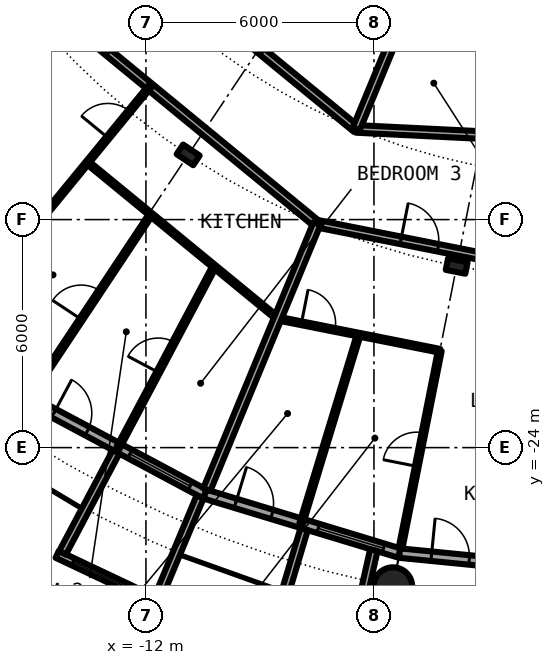
"""IFC4 building model, lengths in metres.
Left out: names, types, materials, properties, quantities, classifications, styles, units other than length and angle.
Written with IfcOpenShell. Run it as: python <this file> out.ifc"""

import sys

from ifc_helpers import new_model, si_unit, direction, frame, frame_2d, origin, origin_2d, place, context, subcontext, project, spatial, rectangle, circle, hollow_circle, i_section, extrude, element, fill, save


model = new_model("IFC4")
c1 = context("Model", 3, precision=1e-05, world=origin(), true_north=direction((0.0, 1.0)))
c2 = subcontext(c1, "Body", "Model", "MODEL_VIEW")
j1 = project(units=[si_unit("LENGTHUNIT", "METRE"), si_unit("PLANEANGLEUNIT", "RADIAN")], contexts=[c1])
p1 = place(None, origin())
s1 = spatial("IfcSite", under=j1, at=p1, CompositionType="ELEMENT")
p2 = place(p1, origin())
s2 = spatial("IfcBuilding", under=s1, at=p2, CompositionType="ELEMENT")
p3 = place(p2, frame((0.0, 0.0, 69.7)))
s3 = spatial("IfcBuildingStorey", under=s2, at=p3, CompositionType="ELEMENT", Elevation=69.7)
p4 = place(p3, frame((-5.501, -27.658, 0.0), z_axis=(0.0, 0.0, 1.0), x_axis=(1.0, 0.0, 0.0)))
e1 = element("IfcColumn", 1, at=p4, inside=s3, PredefinedType="COLUMN", context=c2, shape_type="SweptSolid", body=[
    extrude(hollow_circle(Radius=0.508, WallThickness=0.04, at=origin_2d()), origin(), (0.0, 0.0, 1.0), 3.05),
])
for number, where, z_axis, x_axis in (
    (2, (-10.889, -16.297, 0.0), (0.0, 0.0, 1.0), (-0.556, -0.831, 0.0)),
    (3, (-3.824, -19.223, 0.0), (0.0, 0.0, 1.0), (-0.195, -0.981, 0.0)),
):
    element("IfcColumn", number, at=place(p3, frame(where, z_axis=z_axis, x_axis=x_axis)), inside=s3, PredefinedType="COLUMN", context=c2, shape_type="SweptSolid", body=[
        extrude(i_section(OverallWidth=0.306, OverallDepth=0.524, WebThickness=0.021, FlangeThickness=0.04, FilletRadius=0.027, at=origin_2d()), origin(), (0.0, 0.0, 1.0), 3.05),
    ])
p5 = place(p3, frame((-15.167, -22.699, 0.0), z_axis=(0.0, 0.0, 1.0), x_axis=(0.881915646801, -0.471407246368, 0.0)))
e4 = element("IfcWall", 4, at=p5, inside=s3, PredefinedType="SOLIDWALL", context=c2, shape_type="SweptSolid", body=[
    extrude(rectangle(XDim=5.352, YDim=0.25, at=frame_2d((2.676, 0.0))), origin(), (0.0, 0.0, 1.0), 2.7),
])
p6 = place(p5, frame((0.841, 0.0, 0.0)))
e5 = element("IfcOpeningElement", 5, at=p6, cuts=e4, PredefinedType="OPENING", context=c2, shape_type="SweptSolid", body=[
    extrude(rectangle(XDim=1.0, YDim=2.2, at=frame_2d((0.5, 1.1))), frame((0.0, 0.135, 0.0), z_axis=(0.0, -1.0, 0.0), x_axis=(1.0, 0.0, 0.0)), (0.0, 0.0, 1.0), 0.27),
])
p7 = place(p5, frame((3.111, 0.0, 0.3)))
e6 = element("IfcOpeningElement", 6, at=p7, cuts=e4, PredefinedType="OPENING", context=c2, shape_type="SweptSolid", body=[
    extrude(rectangle(XDim=1.8, YDim=2.1, at=frame_2d((0.9, 1.05))), frame((0.0, 0.135, 0.0), z_axis=(0.0, -1.0, 0.0), x_axis=(1.0, 0.0, 0.0)), (0.0, 0.0, 1.0), 0.27),
])
p8 = place(p3, frame((-14.335, -26.808, -0.03), z_axis=(0.0, 0.0, 1.0), x_axis=(0.904000060331, -0.427532327342, 0.0)))
e7 = element("IfcWall", 7, at=p8, inside=s3, PredefinedType="SOLIDWALL", context=c2, shape_type="SweptSolid", body=[
    extrude(rectangle(XDim=2.993, YDim=0.2, at=frame_2d((1.497, 0.0))), origin(), (0.0, 0.0, 1.0), 2.73),
])
p9 = place(p8, frame((0.457, 0.0, 0.33)))
e8 = element("IfcOpeningElement", 8, at=p9, cuts=e7, PredefinedType="OPENING", context=c2, shape_type="SweptSolid", body=[
    extrude(circle(Radius=1.04, at=frame_2d((1.04, 1.04))), frame((0.0, 0.11, 0.0), z_axis=(0.0, -1.0, 0.0), x_axis=(1.0, 0.0, 0.0)), (0.0, 0.0, 1.0), 0.22),
])
p10 = place(p3, frame((-12.787, -24.113, -0.03), z_axis=(0.0, 0.0, 1.0), x_axis=(-0.468365282436, -0.883534924159, 0.0)))
e9 = element("IfcWall", 9, at=p10, inside=s3, PredefinedType="SOLIDWALL", context=c2, shape_type="SweptSolid", body=[
    extrude(rectangle(XDim=3.006, YDim=0.2, at=frame_2d((1.503, 0.0))), origin(), (0.0, 0.0, 1.0), 2.73),
])
p11 = place(p3, frame((-10.575, -25.295, -0.03), z_axis=(0.0, 0.0, 1.0), x_axis=(-0.385697364644, -0.922625353492, 0.0)))
e10 = element("IfcWall", 10, at=p11, inside=s3, PredefinedType="SOLIDWALL", context=c2, shape_type="SweptSolid", body=[
    extrude(rectangle(XDim=2.883, YDim=0.2, at=frame_2d((1.442, 0.0))), origin(), (0.0, 0.0, 1.0), 2.73),
])
p12 = place(p3, frame((-10.447, -25.222, 0.0), z_axis=(0.0, 0.0, 1.0), x_axis=(0.956965678721, -0.290201119486, 0.0)))
e11 = element("IfcWall", 11, at=p12, inside=s3, PredefinedType="SOLIDWALL", context=c2, shape_type="SweptSolid", body=[
    extrude(rectangle(XDim=5.351, YDim=0.25, at=frame_2d((2.676, 0.0))), origin(), (0.0, 0.0, 1.0), 2.7),
])
p13 = place(p12, frame((0.841, 0.0, 0.0)))
e12 = element("IfcOpeningElement", 12, at=p13, cuts=e11, PredefinedType="OPENING", context=c2, shape_type="SweptSolid", body=[
    extrude(rectangle(XDim=1.0, YDim=2.2, at=frame_2d((0.5, 1.1))), frame((0.0, 0.135, 0.0), z_axis=(0.0, -1.0, 0.0), x_axis=(1.0, 0.0, 0.0)), (0.0, 0.0, 1.0), 0.27),
])
p14 = place(p12, frame((3.111, 0.0, 0.3)))
e13 = element("IfcOpeningElement", 13, at=p14, cuts=e11, PredefinedType="OPENING", context=c2, shape_type="SweptSolid", body=[
    extrude(rectangle(XDim=1.8, YDim=2.1, at=frame_2d((0.9, 1.05))), frame((0.0, 0.135, 0.0), z_axis=(0.0, -1.0, 0.0), x_axis=(1.0, 0.0, 0.0)), (0.0, 0.0, 1.0), 0.27),
])
p15 = place(p3, frame((-7.837, -26.144, -0.03), z_axis=(0.0, 0.0, 1.0), x_axis=(-0.287064767992, -0.957911174889, 0.0)))
e14 = element("IfcWall", 14, at=p15, inside=s3, PredefinedType="SOLIDWALL", context=c2, shape_type="SweptSolid", body=[
    extrude(rectangle(XDim=3.006, YDim=0.2, at=frame_2d((1.503, 0.0))), origin(), (0.0, 0.0, 1.0), 2.73),
])
p16 = place(p3, frame((-6.004, -26.7, -0.03), z_axis=(0.0, 0.0, 1.0), x_axis=(-0.219609259383, -0.975587911566, 0.0)))
e15 = element("IfcWall", 15, at=p16, inside=s3, PredefinedType="SOLIDWALL", context=c2, shape_type="SweptSolid", body=[
    extrude(rectangle(XDim=2.933, YDim=0.2, at=frame_2d((1.466, 0.0))), origin(), (0.0, 0.0, 1.0), 2.73),
])
p17 = place(p3, frame((-5.326, -26.775, 0.0), z_axis=(0.0, 0.0, 1.0), x_axis=(0.995173996315, -0.098126026407, 0.0)))
e16 = element("IfcWall", 16, at=p17, inside=s3, PredefinedType="SOLIDWALL", context=c2, shape_type="SweptSolid", body=[
    extrude(rectangle(XDim=5.352, YDim=0.25, at=frame_2d((2.676, 0.0))), origin(), (0.0, 0.0, 1.0), 2.7),
])
p18 = place(p17, frame((0.841, 0.0, 0.0)))
e17 = element("IfcOpeningElement", 17, at=p18, cuts=e16, PredefinedType="OPENING", context=c2, shape_type="SweptSolid", body=[
    extrude(rectangle(XDim=1.0, YDim=2.2, at=frame_2d((0.5, 1.1))), frame((0.0, 0.135, 0.0), z_axis=(0.0, -1.0, 0.0), x_axis=(1.0, 0.0, 0.0)), (0.0, 0.0, 1.0), 0.27),
])
p19 = place(p17, frame((3.111, 0.0, 0.3)))
e18 = element("IfcOpeningElement", 18, at=p19, cuts=e16, PredefinedType="OPENING", context=c2, shape_type="SweptSolid", body=[
    extrude(rectangle(XDim=1.8, YDim=2.1, at=frame_2d((0.9, 1.05))), frame((0.0, 0.135, 0.0), z_axis=(0.0, -1.0, 0.0), x_axis=(1.0, 0.0, 0.0)), (0.0, 0.0, 1.0), 0.27),
])
p20 = place(p3, frame((-8.536, -20.603, 0.0), z_axis=(0.0, 0.0, 1.0), x_axis=(0.980795826794, -0.195037294239, 0.0)))
e19 = element("IfcWall", 19, at=p20, inside=s3, PredefinedType="PARTITIONING", context=c2, shape_type="SweptSolid", body=[
    extrude(rectangle(XDim=4.352, YDim=0.1, at=frame_2d((2.176, 0.0))), origin(), (0.0, 0.0, 1.0), 2.7),
])
p21 = place(p20, frame((0.639, 0.0, 0.0)))
e20 = element("IfcOpeningElement", 20, at=p21, cuts=e19, PredefinedType="OPENING", context=c2, shape_type="SweptSolid", body=[
    extrude(rectangle(XDim=0.9, YDim=2.3, at=frame_2d((0.45, 1.15))), frame((0.0, 0.06, 0.0), z_axis=(0.0, -1.0, 0.0), x_axis=(1.0, 0.0, 0.0)), (0.0, 0.0, 1.0), 0.12),
])
p22 = place(p3, frame((-13.538, -16.496, 0.0), z_axis=(0.0, 0.0, 1.0), x_axis=(0.773000340237, -0.634405606843, 0.0)))
e21 = element("IfcWall", 21, at=p22, inside=s3, PredefinedType="PARTITIONING", context=c2, shape_type="SweptSolid", body=[
    extrude(rectangle(XDim=6.474, YDim=0.1, at=frame_2d((3.237, 0.0))), origin(), (0.0, 0.0, 1.0), 2.7),
])
p23 = place(p3, frame((-7.501, -18.108, 0.0), z_axis=(0.0, 0.0, 1.0), x_axis=(0.980781515054, -0.195109250749, 0.0)))
e22 = element("IfcWall", 22, at=p23, inside=s3, PredefinedType="PARTITIONING", context=c2, shape_type="SweptSolid", body=[
    extrude(rectangle(XDim=7.648, YDim=0.2, at=frame_2d((3.824, 0.0))), origin(), (0.0, 0.0, 1.0), 2.38),
])
p24 = place(p23, frame((2.25, 0.0, 0.0)))
e23 = element("IfcOpeningElement", 23, at=p24, cuts=e22, PredefinedType="OPENING", context=c2, shape_type="SweptSolid", body=[
    extrude(rectangle(XDim=1.0, YDim=2.3, at=frame_2d((0.5, 1.15))), frame((0.0, 0.11, 0.0), z_axis=(0.0, -1.0, 0.0), x_axis=(1.0, 0.0, 0.0)), (0.0, 0.0, 1.0), 0.22),
])
p25 = place(p3, frame((-16.172, -10.99, 0.0), z_axis=(0.0, 0.0, 1.0), x_axis=(0.772669779479, -0.634808169355, 0.0)))
e24 = element("IfcWall", 24, at=p25, inside=s3, PredefinedType="PARTITIONING", context=c2, shape_type="SweptSolid", body=[
    extrude(rectangle(XDim=11.208, YDim=0.2, at=frame_2d((5.604, 0.0))), origin(), (0.0, 0.0, 1.0), 2.38),
])
p26 = place(p25, frame((3.135, 0.0, 0.0)))
e25 = element("IfcOpeningElement", 25, at=p26, cuts=e24, PredefinedType="OPENING", context=c2, shape_type="SweptSolid", body=[
    extrude(rectangle(XDim=1.0, YDim=2.3, at=frame_2d((0.5, 1.15))), frame((0.0, 0.11, 0.0), z_axis=(0.0, -1.0, 0.0), x_axis=(1.0, 0.0, 0.0)), (0.0, 0.0, 1.0), 0.22),
])
p27 = place(p3, frame((-14.05, -9.392, 0.0), z_axis=(0.0, 0.0, 1.0), x_axis=(0.773074935257, -0.634314704605, 0.0)))
e26 = element("IfcWall", 26, at=p27, inside=s3, PredefinedType="PARTITIONING", context=c2, shape_type="SweptSolid", body=[
    extrude(rectangle(XDim=9.809, YDim=0.2, at=frame_2d((4.904, 0.0))), origin(), (0.0, 0.0, 1.0), 2.7),
])
p28 = place(p27, frame((4.402, 0.0, 0.0)))
e27 = element("IfcOpeningElement", 27, at=p28, cuts=e26, PredefinedType="OPENING", context=c2, shape_type="SweptSolid", body=[
    extrude(rectangle(XDim=1.0, YDim=2.3, at=frame_2d((0.5, 1.15))), frame((0.0, 0.11, 0.0), z_axis=(0.0, -1.0, 0.0), x_axis=(1.0, 0.0, 0.0)), (0.0, 0.0, 1.0), 0.22),
])
p29 = place(p3, frame((-6.469, -15.614, 0.0), z_axis=(0.0, 0.0, 1.0), x_axis=(0.998798520108, -0.049005267363, 0.0)))
e28 = element("IfcWall", 28, at=p29, inside=s3, PredefinedType="PARTITIONING", context=c2, shape_type="SweptSolid", body=[
    extrude(rectangle(XDim=11.389, YDim=0.2, at=frame_2d((5.694, 0.0))), origin(), (0.0, 0.0, 1.0), 2.7),
])
p30 = place(p29, frame((4.383, 0.0, 0.0)))
e29 = element("IfcOpeningElement", 29, at=p30, cuts=e28, PredefinedType="OPENING", context=c2, shape_type="SweptSolid", body=[
    extrude(rectangle(XDim=1.0, YDim=2.3, at=frame_2d((0.5, 1.15))), frame((0.0, 0.11, 0.0), z_axis=(0.0, -1.0, 0.0), x_axis=(1.0, 0.0, 0.0)), (0.0, 0.0, 1.0), 0.22),
])
p31 = place(p3, frame((-17.24, -21.007, 0.0), z_axis=(0.0, 0.0, 1.0), x_axis=(0.634396151441, 0.77300810024, 0.0)))
e30 = element("IfcWall", 30, at=p31, inside=s3, PredefinedType="PARTITIONING", context=c2, shape_type="SweptSolid", body=[
    extrude(rectangle(XDim=8.419, YDim=0.1, at=frame_2d((4.209, 0.0))), origin(), (0.0, 0.0, 1.0), 2.7),
])
p32 = place(p31, frame((6.679, 0.0, 0.0)))
e31 = element("IfcOpeningElement", 31, at=p32, cuts=e30, PredefinedType="OPENING", context=c2, shape_type="SweptSolid", body=[
    extrude(rectangle(XDim=0.9, YDim=2.3, at=frame_2d((0.45, 1.15))), frame((0.0, 0.06, 0.0), z_axis=(0.0, -1.0, 0.0), x_axis=(1.0, 0.0, 0.0)), (0.0, 0.0, 1.0), 0.12),
])
p33 = place(p31, frame((2.468, 0.0, 0.0)))
e32 = element("IfcOpeningElement", 32, at=p33, cuts=e30, PredefinedType="OPENING", context=c2, shape_type="SweptSolid", body=[
    extrude(rectangle(XDim=0.9, YDim=2.3, at=frame_2d((0.45, 1.15))), frame((0.0, 0.06, 0.0), z_axis=(0.0, -1.0, 0.0), x_axis=(1.0, 0.0, 0.0)), (0.0, 0.0, 1.0), 0.12),
])
p34 = place(p3, frame((-15.041, -22.632, 0.0), z_axis=(0.0, 0.0, 1.0), x_axis=(0.553637025191, 0.83275809473, 0.0)))
e33 = element("IfcWall", 33, at=p34, inside=s3, PredefinedType="PARTITIONING", context=c2, shape_type="SweptSolid", body=[
    extrude(rectangle(XDim=5.726, YDim=0.1, at=frame_2d((2.863, 0.0))), origin(), (0.0, 0.0, 1.0), 2.7),
])
p35 = place(p34, frame((2.412, 0.0, 0.0)))
e34 = element("IfcOpeningElement", 34, at=p35, cuts=e33, PredefinedType="OPENING", context=c2, shape_type="SweptSolid", body=[
    extrude(rectangle(XDim=0.9, YDim=2.3, at=frame_2d((0.45, 1.15))), frame((0.0, 0.06, 0.0), z_axis=(0.0, -1.0, 0.0), x_axis=(1.0, 0.0, 0.0)), (0.0, 0.0, 1.0), 0.12),
])
p36 = place(p3, frame((-12.734, -24.007, 0.0), z_axis=(0.0, 0.0, 1.0), x_axis=(0.468610030042, 0.883405139075, 0.0)))
e35 = element("IfcWall", 35, at=p36, inside=s3, PredefinedType="PARTITIONING", context=c2, shape_type="SweptSolid", body=[
    extrude(rectangle(XDim=5.403, YDim=0.1, at=frame_2d((2.702, 0.0))), origin(), (0.0, 0.0, 1.0), 2.7),
])
p37 = place(p36, frame((2.252, 0.0, 0.0)))
e36 = element("IfcOpeningElement", 36, at=p37, cuts=e35, PredefinedType="OPENING", context=c2, shape_type="SweptSolid", body=[
    extrude(rectangle(XDim=0.9, YDim=2.3, at=frame_2d((0.45, 1.15))), frame((0.0, 0.06, 0.0), z_axis=(0.0, -1.0, 0.0), x_axis=(1.0, 0.0, 0.0)), (0.0, 0.0, 1.0), 0.12),
])
p38 = place(p3, frame((-10.399, -25.106, 0.0), z_axis=(0.0, 0.0, 1.0), x_axis=(0.382600411313, 0.923913916587, 0.0)))
e37 = element("IfcWall", 37, at=p38, inside=s3, PredefinedType="PARTITIONING", context=c2, shape_type="SweptSolid", body=[
    extrude(rectangle(XDim=7.574, YDim=0.2, at=frame_2d((3.787, 0.0))), origin(), (0.0, 0.0, 1.0), 2.7),
])
p39 = place(p3, frame((-7.913, -25.997, 0.0), z_axis=(0.0, 0.0, 1.0), x_axis=(0.291264462755, 0.956642573136, 0.0)))
e38 = element("IfcWall", 38, at=p39, inside=s3, PredefinedType="PARTITIONING", context=c2, shape_type="SweptSolid", body=[
    extrude(rectangle(XDim=5.195, YDim=0.1, at=frame_2d((2.598, 0.0))), origin(), (0.0, 0.0, 1.0), 2.7),
])
p40 = place(p3, frame((-6.467, -15.614, 0.0), z_axis=(0.0, 0.0, 1.0), x_axis=(0.382646942224, 0.923894646378, 0.0)))
e39 = element("IfcWall", 39, at=p40, inside=s3, PredefinedType="PARTITIONING", context=c2, shape_type="SweptSolid", body=[
    extrude(rectangle(XDim=9.181, YDim=0.2, at=frame_2d((4.59, 0.0))), origin(), (0.0, 0.0, 1.0), 2.7),
])
p41 = place(p3, frame((-5.302, -26.653, 0.0), z_axis=(0.0, 0.0, 1.0), x_axis=(0.195115793364, 0.980780213493, 0.0)))
e40 = element("IfcWall", 40, at=p41, inside=s3, PredefinedType="PARTITIONING", context=c2, shape_type="SweptSolid", body=[
    extrude(rectangle(XDim=5.304, YDim=0.1, at=frame_2d((2.652, 0.0))), origin(), (0.0, 0.0, 1.0), 2.7),
])
p42 = place(p41, frame((2.202, 0.0, 0.0)))
e41 = element("IfcOpeningElement", 41, at=p42, cuts=e40, PredefinedType="OPENING", context=c2, shape_type="SweptSolid", body=[
    extrude(rectangle(XDim=0.9, YDim=2.3, at=frame_2d((0.45, 1.15))), frame((0.0, 0.06, 0.0), z_axis=(0.0, -1.0, 0.0), x_axis=(1.0, 0.0, 0.0)), (0.0, 0.0, 1.0), 0.12),
])
p43 = place(p6, origin())
e42 = element("IfcDoor", 42, at=p43, inside=s3, OperationType="SINGLE_SWING_LEFT", PredefinedType="DOOR", context=c2, shape_type="SweptSolid", body=[
    extrude(rectangle(XDim=1.0, YDim=2.2, at=frame_2d((0.5, 1.1))), frame((0.0, 0.025, 0.0), z_axis=(0.0, -1.0, 0.0), x_axis=(1.0, 0.0, 0.0)), (0.0, 0.0, 1.0), 0.05),
])
fill(e5, e42)
p44 = place(p7, origin())
e43 = element("IfcWindow", 43, at=p44, inside=s3, PartitioningType="SINGLE_PANEL", PredefinedType="WINDOW", context=c2, shape_type="SweptSolid", body=[
    extrude(rectangle(XDim=1.8, YDim=2.1, at=frame_2d((0.9, 1.05))), frame((0.0, 0.03, 0.0), z_axis=(0.0, -1.0, 0.0), x_axis=(1.0, 0.0, 0.0)), (0.0, 0.0, 1.0), 0.06),
])
fill(e6, e43)
p45 = place(p9, origin())
e44 = element("IfcWindow", 44, at=p45, inside=s3, PartitioningType="SINGLE_PANEL", PredefinedType="WINDOW", context=c2, shape_type="SweptSolid", body=[
    extrude(circle(Radius=1.04, at=frame_2d((1.04, 1.04))), frame((0.0, 0.03, 0.0), z_axis=(0.0, -1.0, 0.0), x_axis=(1.0, 0.0, 0.0)), (0.0, 0.0, 1.0), 0.06),
])
fill(e8, e44)
p46 = place(p13, origin())
e45 = element("IfcDoor", 45, at=p46, inside=s3, OperationType="SINGLE_SWING_LEFT", PredefinedType="DOOR", context=c2, shape_type="SweptSolid", body=[
    extrude(rectangle(XDim=1.0, YDim=2.2, at=frame_2d((0.5, 1.1))), frame((0.0, 0.025, 0.0), z_axis=(0.0, -1.0, 0.0), x_axis=(1.0, 0.0, 0.0)), (0.0, 0.0, 1.0), 0.05),
])
fill(e12, e45)
p47 = place(p14, origin())
e46 = element("IfcWindow", 46, at=p47, inside=s3, PartitioningType="SINGLE_PANEL", PredefinedType="WINDOW", context=c2, shape_type="SweptSolid", body=[
    extrude(rectangle(XDim=1.8, YDim=2.1, at=frame_2d((0.9, 1.05))), frame((0.0, 0.03, 0.0), z_axis=(0.0, -1.0, 0.0), x_axis=(1.0, 0.0, 0.0)), (0.0, 0.0, 1.0), 0.06),
])
fill(e13, e46)
p48 = place(p18, origin())
e47 = element("IfcDoor", 47, at=p48, inside=s3, OperationType="SINGLE_SWING_LEFT", PredefinedType="DOOR", context=c2, shape_type="SweptSolid", body=[
    extrude(rectangle(XDim=1.0, YDim=2.2, at=frame_2d((0.5, 1.1))), frame((0.0, 0.025, 0.0), z_axis=(0.0, -1.0, 0.0), x_axis=(1.0, 0.0, 0.0)), (0.0, 0.0, 1.0), 0.05),
])
fill(e17, e47)
p49 = place(p26, origin())
e48 = element("IfcDoor", 48, at=p49, inside=s3, OperationType="SINGLE_SWING_LEFT", PredefinedType="DOOR", context=c2, shape_type="SweptSolid", body=[
    extrude(rectangle(XDim=1.0, YDim=2.3, at=frame_2d((0.5, 1.15))), frame((0.0, 0.025, 0.0), z_axis=(0.0, -1.0, 0.0), x_axis=(1.0, 0.0, 0.0)), (0.0, 0.0, 1.0), 0.05),
])
fill(e25, e48)
p50 = place(p32, origin())
e49 = element("IfcDoor", 49, at=p50, inside=s3, OperationType="SINGLE_SWING_RIGHT", PredefinedType="DOOR", context=c2, shape_type="SweptSolid", body=[
    extrude(rectangle(XDim=0.9, YDim=2.3, at=frame_2d((0.45, 1.15))), frame((0.0, 0.025, 0.0), z_axis=(0.0, -1.0, 0.0), x_axis=(1.0, 0.0, 0.0)), (0.0, 0.0, 1.0), 0.05),
])
fill(e31, e49)
p51 = place(p35, origin())
e50 = element("IfcDoor", 50, at=p51, inside=s3, OperationType="SINGLE_SWING_LEFT", PredefinedType="DOOR", context=c2, shape_type="SweptSolid", body=[
    extrude(rectangle(XDim=0.9, YDim=2.3, at=frame_2d((0.45, 1.15))), frame((0.0, 0.025, 0.0), z_axis=(0.0, -1.0, 0.0), x_axis=(1.0, 0.0, 0.0)), (0.0, 0.0, 1.0), 0.05),
])
fill(e34, e50)
p52 = place(p37, origin())
e51 = element("IfcDoor", 51, at=p52, inside=s3, OperationType="SINGLE_SWING_LEFT", PredefinedType="DOOR", context=c2, shape_type="SweptSolid", body=[
    extrude(rectangle(XDim=0.9, YDim=2.3, at=frame_2d((0.45, 1.15))), frame((0.0, 0.025, 0.0), z_axis=(0.0, -1.0, 0.0), x_axis=(1.0, 0.0, 0.0)), (0.0, 0.0, 1.0), 0.05),
])
fill(e36, e51)
p53 = place(p24, origin())
e52 = element("IfcDoor", 52, at=p53, inside=s3, OperationType="SINGLE_SWING_LEFT", PredefinedType="DOOR", context=c2, shape_type="SweptSolid", body=[
    extrude(rectangle(XDim=1.0, YDim=2.3, at=frame_2d((0.5, 1.15))), frame((0.0, 0.025, 0.0), z_axis=(0.0, -1.0, 0.0), x_axis=(1.0, 0.0, 0.0)), (0.0, 0.0, 1.0), 0.05),
])
fill(e23, e52)
p54 = place(p42, origin())
e53 = element("IfcDoor", 53, at=p54, inside=s3, OperationType="SINGLE_SWING_LEFT", PredefinedType="DOOR", context=c2, shape_type="SweptSolid", body=[
    extrude(rectangle(XDim=0.9, YDim=2.3, at=frame_2d((0.45, 1.15))), frame((0.0, 0.025, 0.0), z_axis=(0.0, -1.0, 0.0), x_axis=(1.0, 0.0, 0.0)), (0.0, 0.0, 1.0), 0.05),
])
fill(e41, e53)
p55 = place(p21, origin())
e54 = element("IfcDoor", 54, at=p55, inside=s3, OperationType="SINGLE_SWING_LEFT", PredefinedType="DOOR", context=c2, shape_type="SweptSolid", body=[
    extrude(rectangle(XDim=0.9, YDim=2.3, at=frame_2d((0.45, 1.15))), frame((0.0, 0.025, 0.0), z_axis=(0.0, -1.0, 0.0), x_axis=(1.0, 0.0, 0.0)), (0.0, 0.0, 1.0), 0.05),
])
fill(e20, e54)
save(model, sys.argv[1])
